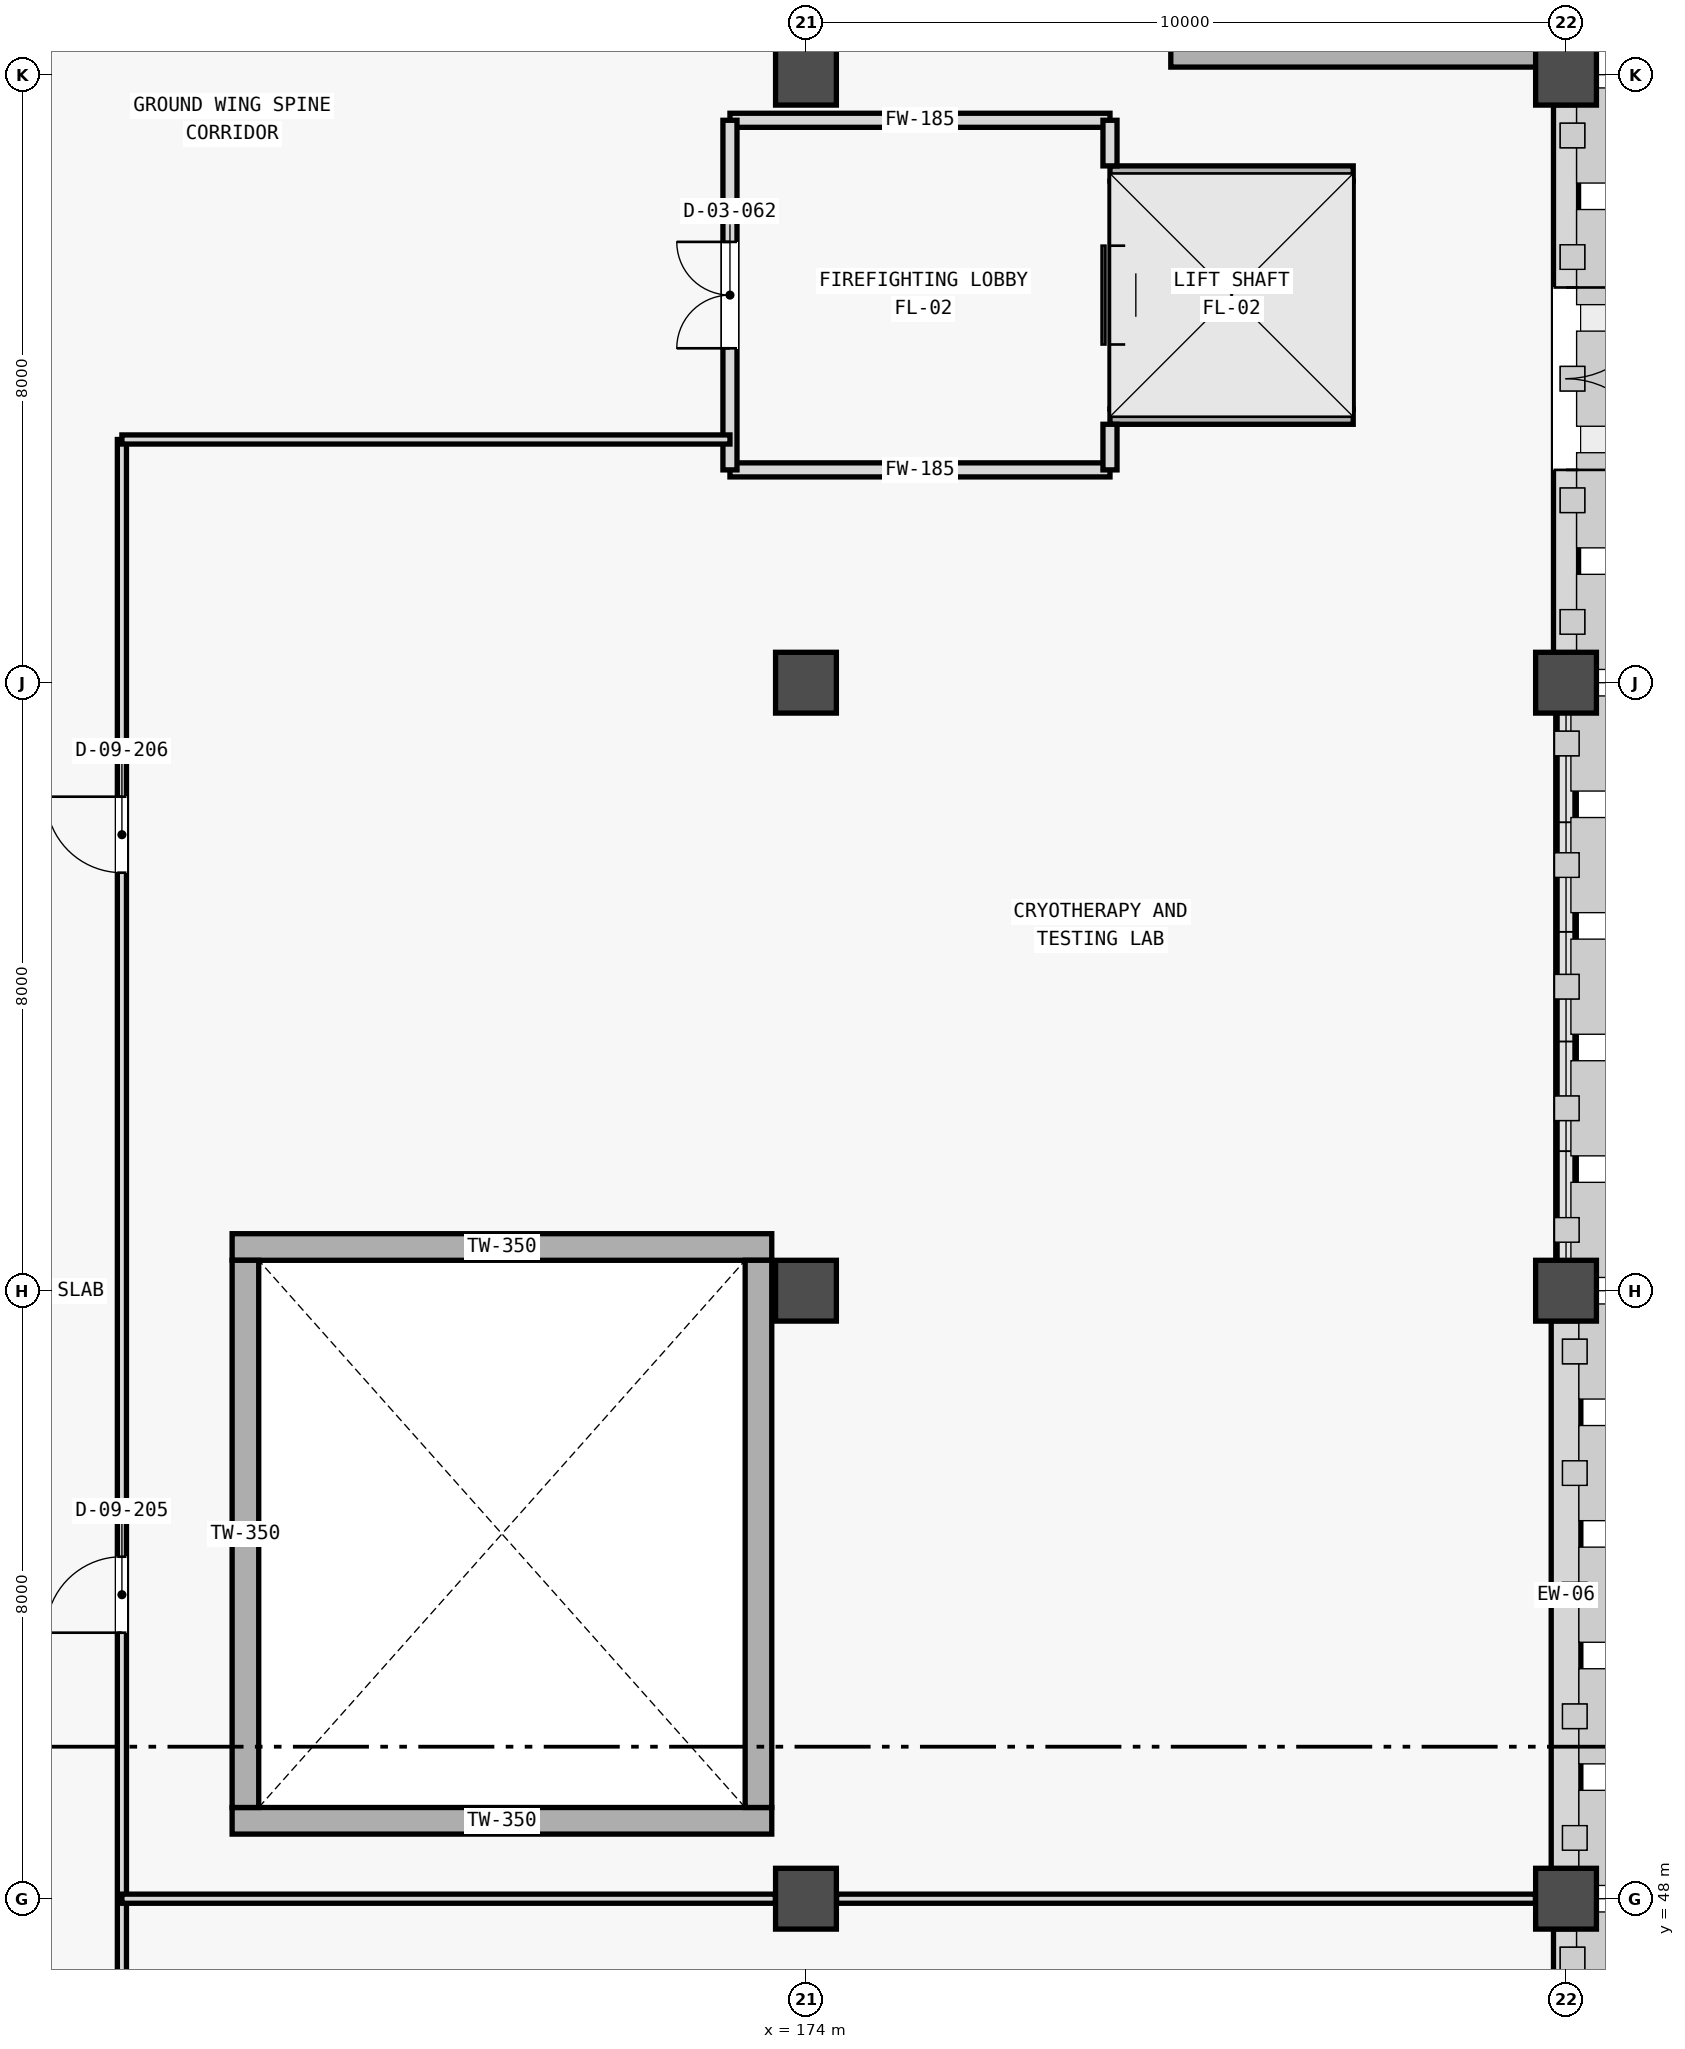
"""IFC4 building model, lengths in metres.
Left out: names, types, materials, properties, quantities, classifications, styles, units other than length and angle.
Written with IfcOpenShell. Run it as: python <this file> out.ifc"""

import sys

from ifc_helpers import new_model, si_unit, direction, frame, frame_2d, origin, origin_2d, place, context, subcontext, project, spatial, rectangle, extrude, element, fill, save


model = new_model("IFC4")
c1 = context("Model", 3, precision=1e-05, world=origin(), true_north=direction((0.0, 1.0)))
c2 = subcontext(c1, "Body", "Model", "MODEL_VIEW")
j1 = project(units=[si_unit("LENGTHUNIT", "METRE"), si_unit("PLANEANGLEUNIT", "RADIAN")], contexts=[c1])
p1 = place(None, origin())
s1 = spatial("IfcSite", under=j1, at=p1, CompositionType="ELEMENT")
p2 = place(p1, origin())
s2 = spatial("IfcBuilding", under=s1, at=p2, CompositionType="ELEMENT")
p3 = place(p2, origin())
s3 = spatial("IfcBuildingStorey", under=s2, at=p3, CompositionType="ELEMENT", Elevation=0.0)
for number, where, z_axis, x_axis in (
    (1, (174.0, 48.0, 0.0), (0.0, 0.0, 1.0), (1.0, 0.0, 0.0)),
    (2, (184.0, 48.0, 0.0), (0.0, 0.0, 1.0), (1.0, 0.0, 0.0)),
    (3, (174.0, 56.0, 0.0), (0.0, 0.0, 1.0), (1.0, 0.0, 0.0)),
    (4, (184.0, 56.0, 0.0), (0.0, 0.0, 1.0), (1.0, 0.0, 0.0)),
    (5, (174.0, 64.0, 0.0), (0.0, 0.0, 1.0), (1.0, 0.0, 0.0)),
    (6, (184.0, 64.0, 0.0), (0.0, 0.0, 1.0), (1.0, 0.0, 0.0)),
    (7, (174.0, 72.0, 0.0), (0.0, 0.0, 1.0), (1.0, 0.0, 0.0)),
    (8, (184.0, 72.0, 0.0), (0.0, 0.0, 1.0), (1.0, 0.0, 0.0)),
):
    element("IfcColumn", number, at=place(p3, frame(where, z_axis=z_axis, x_axis=x_axis)), inside=s3, PredefinedType="COLUMN", context=c2, shape_type="SweptSolid", body=[
        extrude(rectangle(XDim=0.8, YDim=0.8, at=origin_2d()), origin(), (0.0, 0.0, 1.0), 5.125),
    ])
for number, where, z_axis, x_axis in (
    (9, (166.45, 49.025, -1.35), (0.0, 0.0, 1.0), (1.0, 0.0, 0.0)),
    (10, (166.45, 56.575, -1.35), (0.0, 0.0, 1.0), (1.0, 0.0, 0.0)),
):
    element("IfcWall", number, at=place(p3, frame(where, z_axis=z_axis, x_axis=x_axis)), inside=s3, PredefinedType="SOLIDWALL", context=c2, shape_type="SweptSolid", body=[
        extrude(rectangle(XDim=7.1, YDim=0.35, at=frame_2d((3.55, 0.0))), origin(), (0.0, 0.0, 1.0), 1.35),
    ])
for number, where, z_axis, x_axis in (
    (11, (166.625, 49.2, -1.35), (0.0, 0.0, 1.0), (0.0, 1.0, 0.0)),
    (12, (173.375, 49.2, -1.35), (0.0, 0.0, 1.0), (0.0, 1.0, 0.0)),
):
    element("IfcWall", number, at=place(p3, frame(where, z_axis=z_axis, x_axis=x_axis)), inside=s3, PredefinedType="SOLIDWALL", context=c2, shape_type="SweptSolid", body=[
        extrude(rectangle(XDim=7.2, YDim=0.35, at=frame_2d((3.6, 0.0))), origin(), (0.0, 0.0, 1.0), 1.35),
    ])
p4 = place(p3, frame((184.0, 40.396, 0.0), z_axis=(0.0, 0.0, 1.0), x_axis=(0.0, 1.0, 0.0)))
e13 = element("IfcWall", 13, at=p4, inside=s3, PredefinedType="STANDARD", context=c2, shape_type="SweptSolid", body=[
    extrude(rectangle(XDim=7.208, YDim=0.33, at=frame_2d((3.604, 0.0))), origin(), (0.0, 0.0, 1.0), 4.45),
])
p5 = place(p4, frame((2.404, 0.0, 0.0)))
e14 = element("IfcOpeningElement", 14, at=p5, cuts=e13, PredefinedType="OPENING", context=c2, shape_type="SweptSolid", body=[
    extrude(rectangle(XDim=2.4, YDim=2.4, at=frame_2d((1.2, 1.2))), frame((0.0, 0.175, 0.0), z_axis=(0.0, -1.0, 0.0), x_axis=(1.0, 0.0, 0.0)), (0.0, 0.0, 1.0), 0.35),
])
p6 = place(p3, frame((184.0, 48.396, 0.0), z_axis=(0.0, 0.0, 1.0), x_axis=(0.0, 1.0, 0.0)))
e15 = element("IfcWall", 15, at=p6, inside=s3, PredefinedType="STANDARD", context=c2, shape_type="SweptSolid", body=[
    extrude(rectangle(XDim=7.208, YDim=0.39, at=frame_2d((3.604, 0.0))), origin(), (0.0, 0.0, 1.0), 4.45),
])
p7 = place(p3, frame((184.0, 56.396, 0.0), z_axis=(0.0, 0.0, 1.0), x_axis=(0.0, 1.0, 0.0)))
e16 = element("IfcWall", 16, at=p7, inside=s3, PredefinedType="STANDARD", context=c2, shape_type="SweptSolid", body=[
    extrude(rectangle(XDim=7.208, YDim=0.27, at=frame_2d((3.604, 0.0))), origin(), (0.0, 0.0, 1.0), 0.8),
])
p8 = place(p3, frame((184.0, 64.396, 0.0), z_axis=(0.0, 0.0, 1.0), x_axis=(0.0, 1.0, 0.0)))
e17 = element("IfcWall", 17, at=p8, inside=s3, PredefinedType="STANDARD", context=c2, shape_type="SweptSolid", body=[
    extrude(rectangle(XDim=7.208, YDim=0.33, at=frame_2d((3.604, 0.0))), origin(), (0.0, 0.0, 1.0), 4.45),
])
p9 = place(p8, frame((2.404, 0.0, 0.0)))
e18 = element("IfcOpeningElement", 18, at=p9, cuts=e17, PredefinedType="OPENING", context=c2, shape_type="SweptSolid", body=[
    extrude(rectangle(XDim=2.4, YDim=2.4, at=frame_2d((1.2, 1.2))), frame((0.0, 0.175, 0.0), z_axis=(0.0, -1.0, 0.0), x_axis=(1.0, 0.0, 0.0)), (0.0, 0.0, 1.0), 0.35),
])
p10 = place(p3, frame((178.8, 72.225, 0.0), z_axis=(0.0, 0.0, 1.0), x_axis=(1.0, 0.0, 0.0)))
e19 = element("IfcWall", 19, at=p10, inside=s3, PredefinedType="SHEAR", context=c2, shape_type="SweptSolid", body=[
    extrude(rectangle(XDim=5.2, YDim=0.25, at=frame_2d((2.6, 0.0))), origin(), (0.0, 0.0, 1.0), 5.4),
])
for number, where, z_axis, x_axis in (
    (20, (178.0, 67.5, 0.0), (0.0, 0.0, 1.0), (1.0, 0.0, 0.0)),
    (21, (178.0, 70.7, 0.0), (0.0, 0.0, 1.0), (1.0, 0.0, 0.0)),
):
    element("IfcWall", number, at=place(p3, frame(where, z_axis=z_axis, x_axis=x_axis)), inside=s3, PredefinedType="SHEAR", context=c2, shape_type="SweptSolid", body=[
        extrude(rectangle(XDim=3.2, YDim=0.2, at=frame_2d((1.6, 0.0))), origin(), (0.0, 0.0, 1.0), 5.4),
    ])
p11 = place(p3, frame((178.1, 67.6, 0.0), z_axis=(0.0, 0.0, 1.0), x_axis=(0.0, 1.0, 0.0)))
e22 = element("IfcWall", 22, at=p11, inside=s3, PredefinedType="SHEAR", context=c2, shape_type="SweptSolid", body=[
    extrude(rectangle(XDim=3.0, YDim=0.2, at=frame_2d((1.5, 0.0))), origin(), (0.0, 0.0, 1.0), 5.4),
])
p12 = place(p11, frame((0.85, 0.0, 0.0)))
e23 = element("IfcOpeningElement", 23, at=p12, cuts=e22, PredefinedType="OPENING", context=c2, shape_type="SweptSolid", body=[
    extrude(rectangle(XDim=1.3, YDim=2.3, at=frame_2d((0.65, 1.15))), frame((0.0, 0.11, 0.0), z_axis=(0.0, -1.0, 0.0), x_axis=(1.0, 0.0, 0.0)), (0.0, 0.0, 1.0), 0.22),
])
p13 = place(p3, frame((181.1, 67.6, 0.0), z_axis=(0.0, 0.0, 1.0), x_axis=(0.0, 1.0, 0.0)))
e24 = element("IfcWall", 24, at=p13, inside=s3, PredefinedType="SHEAR", context=c2, shape_type="SweptSolid", body=[
    extrude(rectangle(XDim=3.0, YDim=0.2, at=frame_2d((1.5, 0.0))), origin(), (0.0, 0.0, 1.0), 5.4),
])
for number, where, z_axis, x_axis in (
    (25, (178.0, 66.8, 0.0), (0.0, 0.0, 1.0), (-1.0, 0.0, 0.0)),
    (26, (173.0, 71.4, 0.0), (0.0, 0.0, 1.0), (1.0, 0.0, 0.0)),
):
    element("IfcWall", number, at=place(p3, frame(where, z_axis=z_axis, x_axis=x_axis)), inside=s3, PredefinedType="STANDARD", context=c2, shape_type="SweptSolid", body=[
        extrude(rectangle(XDim=5.0, YDim=0.185, at=frame_2d((2.5, 0.0))), origin(), (0.0, 0.0, 1.0), 4.405),
    ])
p14 = place(p3, frame((173.0, 66.8, 0.0), z_axis=(0.0, 0.0, 1.0), x_axis=(0.0, 1.0, 0.0)))
e27 = element("IfcWall", 27, at=p14, inside=s3, PredefinedType="STANDARD", context=c2, shape_type="SweptSolid", body=[
    extrude(rectangle(XDim=4.6, YDim=0.185, at=frame_2d((2.3, 0.0))), origin(), (0.0, 0.0, 1.0), 4.405),
])
p15 = place(p14, frame((1.6, 0.0, 0.0)))
e28 = element("IfcOpeningElement", 28, at=p15, cuts=e27, PredefinedType="OPENING", context=c2, shape_type="SweptSolid", body=[
    extrude(rectangle(XDim=1.4, YDim=2.2, at=frame_2d((0.7, 1.1))), frame((0.0, 0.103, 0.0), z_axis=(0.0, -1.0, 0.0), x_axis=(1.0, 0.0, 0.0)), (0.0, 0.0, 1.0), 0.205),
])
for number, where, z_axis, x_axis in (
    (29, (178.0, 66.8, 0.0), (0.0, 0.0, 1.0), (0.0, 1.0, 0.0)),
    (30, (178.0, 70.8, 0.0), (0.0, 0.0, 1.0), (0.0, 1.0, 0.0)),
):
    element("IfcWall", number, at=place(p3, frame(where, z_axis=z_axis, x_axis=x_axis)), inside=s3, PredefinedType="STANDARD", context=c2, shape_type="SweptSolid", body=[
        extrude(rectangle(XDim=0.6, YDim=0.185, at=frame_2d((0.3, 0.0))), origin(), (0.0, 0.0, 1.0), 4.405),
    ])
p16 = place(p3, frame((165.0, 35.4, 0.0), z_axis=(0.0, 0.0, 1.0), x_axis=(0.0, 1.0, 0.0)))
e31 = element("IfcWall", 31, at=p16, inside=s3, PredefinedType="PARTITIONING", context=c2, shape_type="SweptSolid", body=[
    extrude(rectangle(XDim=31.8, YDim=0.12, at=frame_2d((15.9, 0.0))), origin(), (0.0, 0.0, 1.0), 4.155),
])
p17 = place(p16, frame((2.1, 0.0, 0.0)))
e32 = element("IfcOpeningElement", 32, at=p17, cuts=e31, PredefinedType="OPENING", context=c2, shape_type="SweptSolid", body=[
    extrude(rectangle(XDim=1.25, YDim=2.25, at=frame_2d((0.625, 1.125))), frame((0.0, 0.07, 0.0), z_axis=(0.0, -1.0, 0.0), x_axis=(1.0, 0.0, 0.0)), (0.0, 0.0, 1.0), 0.14),
])
p18 = place(p16, frame((8.4, 0.0, 0.0)))
e33 = element("IfcOpeningElement", 33, at=p18, cuts=e31, PredefinedType="OPENING", context=c2, shape_type="SweptSolid", body=[
    extrude(rectangle(XDim=1.25, YDim=2.25, at=frame_2d((0.625, 1.125))), frame((0.0, 0.07, 0.0), z_axis=(0.0, -1.0, 0.0), x_axis=(1.0, 0.0, 0.0)), (0.0, 0.0, 1.0), 0.14),
])
p19 = place(p16, frame((16.1, 0.0, 0.0)))
e34 = element("IfcOpeningElement", 34, at=p19, cuts=e31, PredefinedType="OPENING", context=c2, shape_type="SweptSolid", body=[
    extrude(rectangle(XDim=1.0, YDim=2.15, at=frame_2d((0.5, 1.075))), frame((0.0, 0.07, 0.0), z_axis=(0.0, -1.0, 0.0), x_axis=(1.0, 0.0, 0.0)), (0.0, 0.0, 1.0), 0.14),
])
p20 = place(p16, frame((26.1, 0.0, 0.0)))
e35 = element("IfcOpeningElement", 35, at=p20, cuts=e31, PredefinedType="OPENING", context=c2, shape_type="SweptSolid", body=[
    extrude(rectangle(XDim=1.0, YDim=2.15, at=frame_2d((0.5, 1.075))), frame((0.0, 0.07, 0.0), z_axis=(0.0, -1.0, 0.0), x_axis=(1.0, 0.0, 0.0)), (0.0, 0.0, 1.0), 0.14),
])
p21 = place(p3, frame((165.0, 67.2, 0.0), z_axis=(0.0, 0.0, 1.0), x_axis=(1.0, 0.0, 0.0)))
e36 = element("IfcWall", 36, at=p21, inside=s3, PredefinedType="PARTITIONING", context=c2, shape_type="SweptSolid", body=[
    extrude(rectangle(XDim=8.0, YDim=0.12, at=frame_2d((4.0, 0.0))), origin(), (0.0, 0.0, 1.0), 4.805),
])
p22 = place(p3, frame((165.0, 48.0, 0.0), z_axis=(0.0, 0.0, 1.0), x_axis=(1.0, 0.0, 0.0)))
e37 = element("IfcWall", 37, at=p22, inside=s3, PredefinedType="PARTITIONING", context=c2, shape_type="SweptSolid", body=[
    extrude(rectangle(XDim=8.598, YDim=0.12, at=frame_2d((4.299, 0.0))), origin(), (0.0, 0.0, 1.0), 4.155),
])
p23 = place(p3, frame((174.402, 48.0, 0.0), z_axis=(0.0, 0.0, 1.0), x_axis=(1.0, 0.0, 0.0)))
e38 = element("IfcWall", 38, at=p23, inside=s3, PredefinedType="PARTITIONING", context=c2, shape_type="SweptSolid", body=[
    extrude(rectangle(XDim=9.196, YDim=0.12, at=frame_2d((4.598, 0.0))), origin(), (0.0, 0.0, 1.0), 4.255),
])
p24 = place(p9, frame((2.4, 0.0, 0.0), z_axis=(0.0, 0.0, 1.0), x_axis=(-1.0, 0.0, 0.0)))
e39 = element("IfcDoor", 39, at=p24, inside=s3, OperationType="DOUBLE_DOOR_SINGLE_SWING", PredefinedType="DOOR", context=c2, shape_type="SweptSolid", body=[
    extrude(rectangle(XDim=2.4, YDim=2.4, at=frame_2d((1.2, 1.2))), frame((0.0, 0.025, 0.0), z_axis=(0.0, -1.0, 0.0), x_axis=(1.0, 0.0, 0.0)), (0.0, 0.0, 1.0), 0.05),
])
fill(e18, e39)
p25 = place(p12, origin())
e40 = element("IfcDoor", 40, at=p25, inside=s3, OperationType="SLIDING_TO_RIGHT", PredefinedType="DOOR", context=c2, shape_type="SweptSolid", body=[
    extrude(rectangle(XDim=1.3, YDim=2.3, at=frame_2d((0.65, 1.15))), frame((0.0, 0.025, 0.0), z_axis=(0.0, -1.0, 0.0), x_axis=(1.0, 0.0, 0.0)), (0.0, 0.0, 1.0), 0.05),
])
fill(e23, e40)
p26 = place(p15, origin())
e41 = element("IfcDoor", 41, at=p26, inside=s3, OperationType="DOUBLE_DOOR_SINGLE_SWING", PredefinedType="DOOR", context=c2, shape_type="SweptSolid", body=[
    extrude(rectangle(XDim=1.4, YDim=2.2, at=frame_2d((0.7, 1.1))), frame((0.0, 0.025, 0.0), z_axis=(0.0, -1.0, 0.0), x_axis=(1.0, 0.0, 0.0)), (0.0, 0.0, 1.0), 0.05),
])
fill(e28, e41)
p27 = place(p19, origin())
e42 = element("IfcDoor", 42, at=p27, inside=s3, OperationType="SINGLE_SWING_LEFT", PredefinedType="DOOR", context=c2, shape_type="SweptSolid", body=[
    extrude(rectangle(XDim=1.0, YDim=2.15, at=frame_2d((0.5, 1.075))), frame((0.0, 0.025, 0.0), z_axis=(0.0, -1.0, 0.0), x_axis=(1.0, 0.0, 0.0)), (0.0, 0.0, 1.0), 0.05),
])
fill(e34, e42)
p28 = place(p20, origin())
e43 = element("IfcDoor", 43, at=p28, inside=s3, OperationType="SINGLE_SWING_RIGHT", PredefinedType="DOOR", context=c2, shape_type="SweptSolid", body=[
    extrude(rectangle(XDim=1.0, YDim=2.15, at=frame_2d((0.5, 1.075))), frame((0.0, 0.025, 0.0), z_axis=(0.0, -1.0, 0.0), x_axis=(1.0, 0.0, 0.0)), (0.0, 0.0, 1.0), 0.05),
])
fill(e35, e43)
save(model, sys.argv[1])
